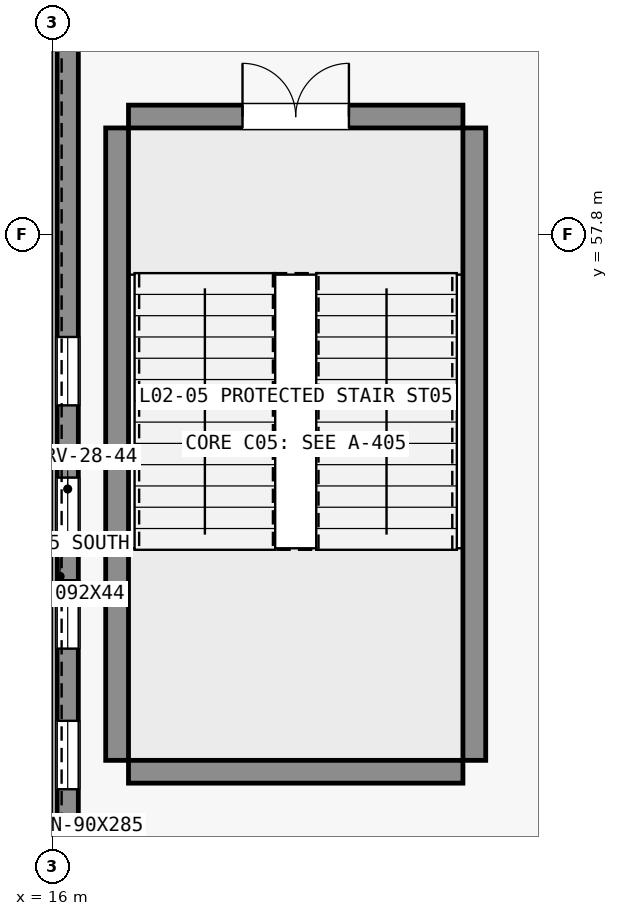
"""IFC4 building model, lengths in metres.
Left out: names, types, materials, properties, quantities, classifications, styles, units other than length and angle.
Written with IfcOpenShell. Run it as: python <this file> out.ifc"""

import sys

from ifc_helpers import new_model, si_unit, direction, frame, frame_2d, origin, place, context, subcontext, project, spatial, rectangle, extrude, element, fill, save


model = new_model("IFC4")
c1 = context("Model", 3, precision=1e-05, world=origin(), true_north=direction((0.0, 1.0)))
c2 = subcontext(c1, "Body", "Model", "MODEL_VIEW")
j1 = project(units=[si_unit("LENGTHUNIT", "METRE"), si_unit("PLANEANGLEUNIT", "RADIAN")], contexts=[c1])
p1 = place(None, origin())
s1 = spatial("IfcSite", under=j1, at=p1, CompositionType="ELEMENT")
p2 = place(p1, origin())
s2 = spatial("IfcBuilding", under=s1, at=p2, CompositionType="ELEMENT")
p3 = place(p2, frame((0.0, 0.0, 11.4)))
s3 = spatial("IfcBuildingStorey", under=s2, at=p3, CompositionType="ELEMENT", Elevation=11.4)
p4 = place(p3, frame((17.0, 50.73, 0.0), z_axis=(0.0, 0.0, 1.0), x_axis=(1.0, 0.0, 0.0)))
e1 = element("IfcWall", 1, at=p4, inside=s3, PredefinedType="SHEAR", context=c2, shape_type="SweptSolid", body=[
    extrude(rectangle(XDim=4.4, YDim=0.3, at=frame_2d((2.2, 0.0))), origin(), (0.0, 0.0, 1.0), 4.8),
])
p5 = place(p3, frame((17.0, 59.35, 0.0), z_axis=(0.0, 0.0, 1.0), x_axis=(1.0, 0.0, 0.0)))
e2 = element("IfcWall", 2, at=p5, inside=s3, PredefinedType="SHEAR", context=c2, shape_type="SweptSolid", body=[
    extrude(rectangle(XDim=4.4, YDim=0.3, at=frame_2d((2.2, 0.0))), origin(), (0.0, 0.0, 1.0), 4.8),
])
p6 = place(p5, frame((1.5, 0.0, 0.0)))
e3 = element("IfcOpeningElement", 3, at=p6, cuts=e2, PredefinedType="OPENING", context=c2, shape_type="SweptSolid", body=[
    extrude(rectangle(XDim=1.4, YDim=2.2, at=frame_2d((0.7, 1.1))), frame((0.0, 0.16, 0.0), z_axis=(0.0, -1.0, 0.0), x_axis=(1.0, 0.0, 0.0)), (0.0, 0.0, 1.0), 0.32),
])
for number, where, z_axis, x_axis in (
    (4, (16.85, 50.88, 0.0), (0.0, 0.0, 1.0), (0.0, 1.0, 0.0)),
    (5, (21.55, 50.88, 0.0), (0.0, 0.0, 1.0), (0.0, 1.0, 0.0)),
):
    element("IfcWall", number, at=place(p3, frame(where, z_axis=z_axis, x_axis=x_axis)), inside=s3, PredefinedType="SHEAR", context=c2, shape_type="SweptSolid", body=[
        extrude(rectangle(XDim=8.32, YDim=0.3, at=frame_2d((4.16, 0.0))), origin(), (0.0, 0.0, 1.0), 4.8),
    ])
p7 = place(p3, frame((16.2, 48.05, 0.0), z_axis=(0.0, 0.0, 1.0), x_axis=(0.0, 1.0, 0.0)))
e6 = element("IfcWall", 6, at=p7, inside=s3, PredefinedType="STANDARD", context=c2, shape_type="SweptSolid", body=[
    extrude(rectangle(XDim=12.8, YDim=0.28, at=frame_2d((6.4, 0.0))), origin(), (0.0, 0.0, 1.0), 4.45),
])
p8 = place(p7, frame((1.1, 0.0, 0.95)))
e7 = element("IfcOpeningElement", 7, at=p8, cuts=e6, PredefinedType="OPENING", context=c2, shape_type="SweptSolid", body=[
    extrude(rectangle(XDim=0.9, YDim=2.85, at=frame_2d((0.45, 1.425))), frame((0.0, 0.15, 0.0), z_axis=(0.0, -1.0, 0.0), x_axis=(1.0, 0.0, 0.0)), (0.0, 0.0, 1.0), 0.3),
])
p9 = place(p7, frame((2.45, 0.0, 0.95)))
e8 = element("IfcOpeningElement", 8, at=p9, cuts=e6, PredefinedType="OPENING", context=c2, shape_type="SweptSolid", body=[
    extrude(rectangle(XDim=0.9, YDim=2.85, at=frame_2d((0.45, 1.425))), frame((0.0, 0.15, 0.0), z_axis=(0.0, -1.0, 0.0), x_axis=(1.0, 0.0, 0.0)), (0.0, 0.0, 1.0), 0.3),
])
p10 = place(p7, frame((4.3, 0.0, 0.95)))
e9 = element("IfcOpeningElement", 9, at=p10, cuts=e6, PredefinedType="OPENING", context=c2, shape_type="SweptSolid", body=[
    extrude(rectangle(XDim=0.9, YDim=2.85, at=frame_2d((0.45, 1.425))), frame((0.0, 0.15, 0.0), z_axis=(0.0, -1.0, 0.0), x_axis=(1.0, 0.0, 0.0)), (0.0, 0.0, 1.0), 0.3),
])
p11 = place(p7, frame((5.65, 0.0, 0.95)))
e10 = element("IfcOpeningElement", 10, at=p11, cuts=e6, PredefinedType="OPENING", context=c2, shape_type="SweptSolid", body=[
    extrude(rectangle(XDim=0.9, YDim=2.85, at=frame_2d((0.45, 1.425))), frame((0.0, 0.15, 0.0), z_axis=(0.0, -1.0, 0.0), x_axis=(1.0, 0.0, 0.0)), (0.0, 0.0, 1.0), 0.3),
])
p12 = place(p7, frame((7.5, 0.0, 0.95)))
e11 = element("IfcOpeningElement", 11, at=p12, cuts=e6, PredefinedType="OPENING", context=c2, shape_type="SweptSolid", body=[
    extrude(rectangle(XDim=0.9, YDim=2.85, at=frame_2d((0.45, 1.425))), frame((0.0, 0.15, 0.0), z_axis=(0.0, -1.0, 0.0), x_axis=(1.0, 0.0, 0.0)), (0.0, 0.0, 1.0), 0.3),
])
p13 = place(p8, origin())
e12 = element("IfcWindow", 12, at=p13, inside=s3, PartitioningType="DOUBLE_PANEL_VERTICAL", PredefinedType="WINDOW", context=c2, shape_type="SweptSolid", body=[
    extrude(rectangle(XDim=0.9, YDim=2.85, at=frame_2d((0.45, 1.425))), frame((0.0, 0.03, 0.0), z_axis=(0.0, -1.0, 0.0), x_axis=(1.0, 0.0, 0.0)), (0.0, 0.0, 1.0), 0.06),
])
fill(e7, e12)
p14 = place(p9, origin())
e13 = element("IfcWindow", 13, at=p14, inside=s3, PartitioningType="DOUBLE_PANEL_VERTICAL", PredefinedType="WINDOW", context=c2, shape_type="SweptSolid", body=[
    extrude(rectangle(XDim=0.9, YDim=2.85, at=frame_2d((0.45, 1.425))), frame((0.0, 0.03, 0.0), z_axis=(0.0, -1.0, 0.0), x_axis=(1.0, 0.0, 0.0)), (0.0, 0.0, 1.0), 0.06),
])
fill(e8, e13)
p15 = place(p10, origin())
e14 = element("IfcWindow", 14, at=p15, inside=s3, PartitioningType="DOUBLE_PANEL_VERTICAL", PredefinedType="WINDOW", context=c2, shape_type="SweptSolid", body=[
    extrude(rectangle(XDim=0.9, YDim=2.85, at=frame_2d((0.45, 1.425))), frame((0.0, 0.03, 0.0), z_axis=(0.0, -1.0, 0.0), x_axis=(1.0, 0.0, 0.0)), (0.0, 0.0, 1.0), 0.06),
])
fill(e9, e14)
p16 = place(p11, origin())
e15 = element("IfcWindow", 15, at=p16, inside=s3, PartitioningType="DOUBLE_PANEL_VERTICAL", PredefinedType="WINDOW", context=c2, shape_type="SweptSolid", body=[
    extrude(rectangle(XDim=0.9, YDim=2.85, at=frame_2d((0.45, 1.425))), frame((0.0, 0.03, 0.0), z_axis=(0.0, -1.0, 0.0), x_axis=(1.0, 0.0, 0.0)), (0.0, 0.0, 1.0), 0.06),
])
fill(e10, e15)
p17 = place(p12, origin())
e16 = element("IfcWindow", 16, at=p17, inside=s3, PartitioningType="DOUBLE_PANEL_VERTICAL", PredefinedType="WINDOW", context=c2, shape_type="SweptSolid", body=[
    extrude(rectangle(XDim=0.9, YDim=2.85, at=frame_2d((0.45, 1.425))), frame((0.0, 0.03, 0.0), z_axis=(0.0, -1.0, 0.0), x_axis=(1.0, 0.0, 0.0)), (0.0, 0.0, 1.0), 0.06),
])
fill(e11, e16)
p18 = place(p6, origin())
e17 = element("IfcDoor", 17, at=p18, inside=s3, OperationType="DOUBLE_DOOR_SINGLE_SWING", PredefinedType="DOOR", context=c2, shape_type="SweptSolid", body=[
    extrude(rectangle(XDim=1.4, YDim=2.2, at=frame_2d((0.7, 1.1))), frame((0.0, 0.025, 0.0), z_axis=(0.0, -1.0, 0.0), x_axis=(1.0, 0.0, 0.0)), (0.0, 0.0, 1.0), 0.05),
])
fill(e3, e17)
save(model, sys.argv[1])
